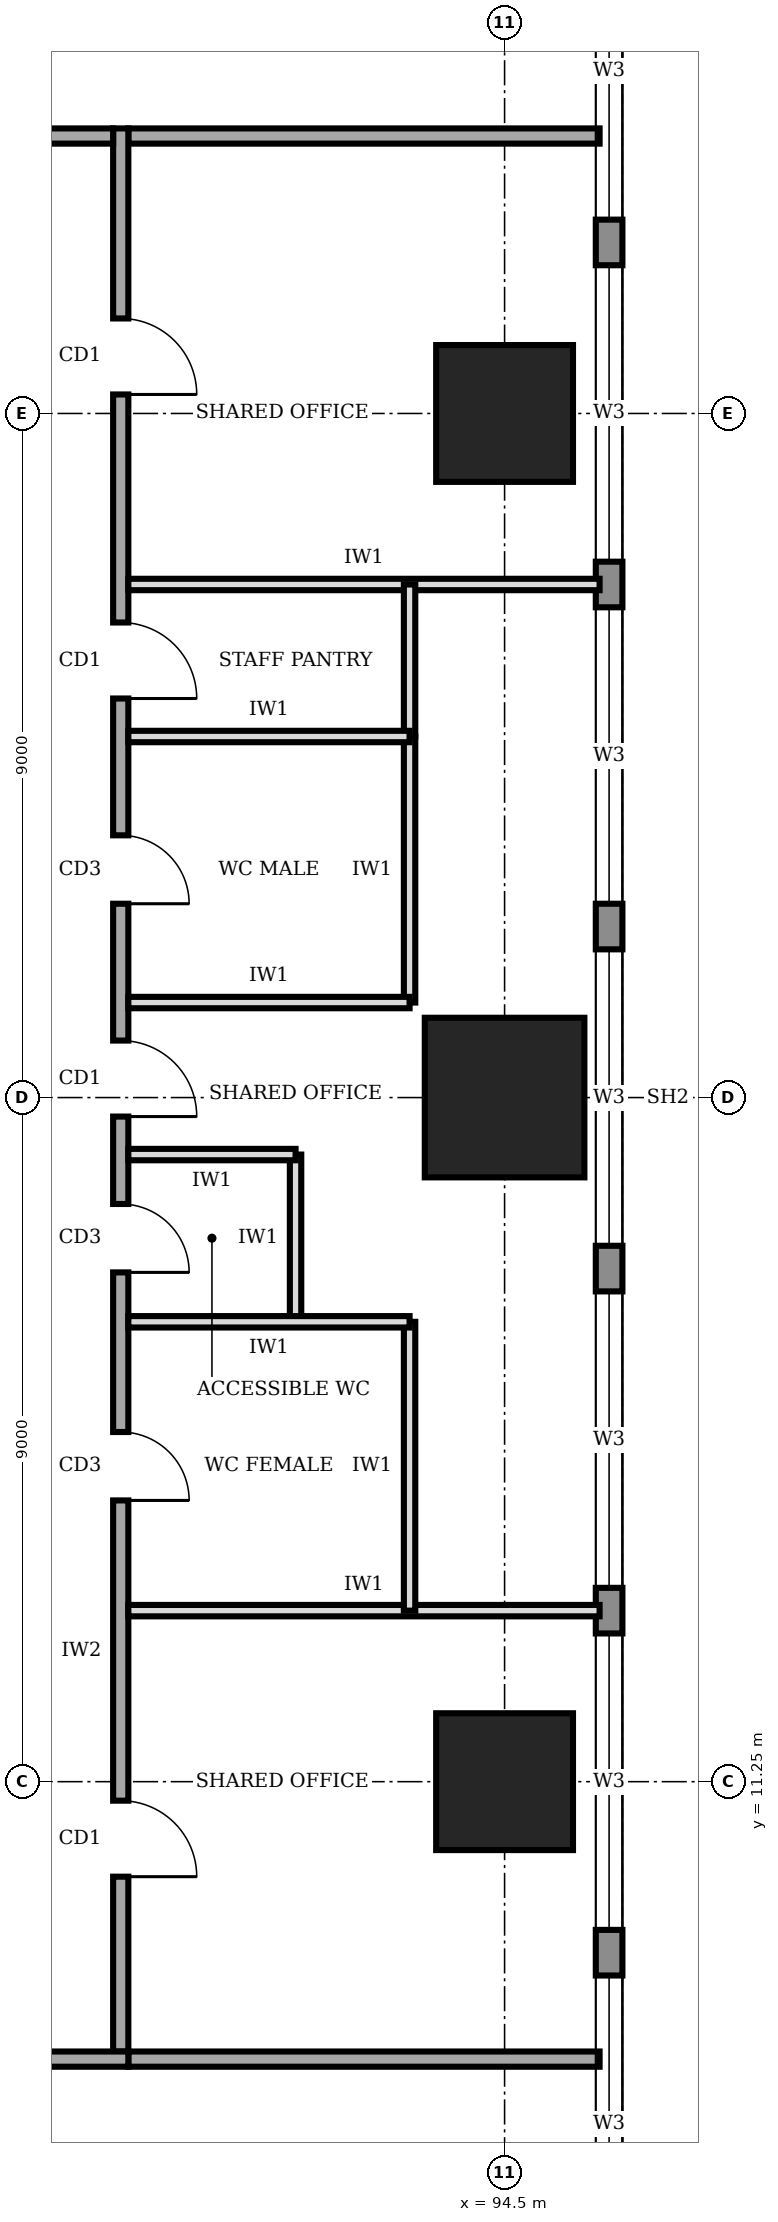
"""IFC4 building model, lengths in metres.
Left out: names, types, materials, properties, quantities, classifications, styles, units other than length and angle.
Written with IfcOpenShell. Run it as: python <this file> out.ifc"""

import sys

from ifc_helpers import new_model, si_unit, direction, frame, frame_2d, origin, origin_2d, place, context, subcontext, project, spatial, rectangle, extrude, element, fill, save


model = new_model("IFC4")
c1 = context("Model", 3, precision=1e-05, world=origin(), true_north=direction((0.0, 1.0)))
c2 = subcontext(c1, "Body", "Model", "MODEL_VIEW")
j1 = project(units=[si_unit("LENGTHUNIT", "METRE"), si_unit("PLANEANGLEUNIT", "RADIAN")], contexts=[c1])
p1 = place(None, origin())
s1 = spatial("IfcSite", under=j1, at=p1, CompositionType="ELEMENT")
p2 = place(p1, origin())
s2 = spatial("IfcBuilding", under=s1, at=p2, CompositionType="ELEMENT")
p3 = place(p2, frame((0.0, 0.0, 197.0)))
s3 = spatial("IfcBuildingStorey", under=s2, at=p3, CompositionType="ELEMENT", Elevation=197.0)
p4 = place(p3, frame((94.5, 11.25, 0.0), z_axis=(0.0, 0.0, 1.0), x_axis=(1.0, 0.0, 0.0)))
e1 = element("IfcColumn", 1, at=p4, inside=s3, PredefinedType="COLUMN", context=c2, shape_type="SweptSolid", body=[
    extrude(rectangle(XDim=1.8, YDim=1.8, at=origin_2d()), origin(), (0.0, 0.0, 1.0), 4.0),
])
p5 = place(p3, frame((94.5, 20.25, 0.0), z_axis=(0.0, 0.0, 1.0), x_axis=(1.0, 0.0, 0.0)))
e2 = element("IfcColumn", 2, at=p5, inside=s3, PredefinedType="COLUMN", context=c2, shape_type="SweptSolid", body=[
    extrude(rectangle(XDim=2.1, YDim=2.1, at=origin_2d()), origin(), (0.0, 0.0, 1.0), 4.0),
])
p6 = place(p3, frame((94.5, 29.25, 0.0), z_axis=(0.0, 0.0, 1.0), x_axis=(1.0, 0.0, 0.0)))
e3 = element("IfcColumn", 3, at=p6, inside=s3, PredefinedType="COLUMN", context=c2, shape_type="SweptSolid", body=[
    extrude(rectangle(XDim=1.8, YDim=1.8, at=origin_2d()), origin(), (0.0, 0.0, 1.0), 4.0),
])
p7 = place(p3, frame((95.875, 3.32, 0.0), z_axis=(0.0, 0.0, 1.0), x_axis=(0.0, 1.0, 0.0)))
e4 = element("IfcWall", 4, at=p7, inside=s3, PredefinedType="STANDARD", context=c2, shape_type="SweptSolid", body=[
    extrude(rectangle(XDim=33.86, YDim=0.35, at=frame_2d((16.93, 0.0))), origin(), (0.0, 0.0, 1.0), 3.75),
])
p8 = place(p7, frame((1.48, 0.0, 0.95)))
e5 = element("IfcOpeningElement", 5, at=p8, cuts=e4, PredefinedType="OPENING", context=c2, shape_type="SweptSolid", body=[
    extrude(rectangle(XDim=3.9, YDim=1.8, at=frame_2d((1.95, 0.9))), frame((0.0, 0.185, 0.0), z_axis=(0.0, -1.0, 0.0), x_axis=(1.0, 0.0, 0.0)), (0.0, 0.0, 1.0), 0.37),
])
p9 = place(p7, frame((5.98, 0.0, 0.95)))
e6 = element("IfcOpeningElement", 6, at=p9, cuts=e4, PredefinedType="OPENING", context=c2, shape_type="SweptSolid", body=[
    extrude(rectangle(XDim=3.9, YDim=1.8, at=frame_2d((1.95, 0.9))), frame((0.0, 0.185, 0.0), z_axis=(0.0, -1.0, 0.0), x_axis=(1.0, 0.0, 0.0)), (0.0, 0.0, 1.0), 0.37),
])
p10 = place(p7, frame((10.48, 0.0, 0.95)))
e7 = element("IfcOpeningElement", 7, at=p10, cuts=e4, PredefinedType="OPENING", context=c2, shape_type="SweptSolid", body=[
    extrude(rectangle(XDim=3.9, YDim=1.8, at=frame_2d((1.95, 0.9))), frame((0.0, 0.185, 0.0), z_axis=(0.0, -1.0, 0.0), x_axis=(1.0, 0.0, 0.0)), (0.0, 0.0, 1.0), 0.37),
])
p11 = place(p7, frame((14.98, 0.0, 0.95)))
e8 = element("IfcOpeningElement", 8, at=p11, cuts=e4, PredefinedType="OPENING", context=c2, shape_type="SweptSolid", body=[
    extrude(rectangle(XDim=3.9, YDim=1.8, at=frame_2d((1.95, 0.9))), frame((0.0, 0.185, 0.0), z_axis=(0.0, -1.0, 0.0), x_axis=(1.0, 0.0, 0.0)), (0.0, 0.0, 1.0), 0.37),
])
p12 = place(p7, frame((19.48, 0.0, 0.95)))
e9 = element("IfcOpeningElement", 9, at=p12, cuts=e4, PredefinedType="OPENING", context=c2, shape_type="SweptSolid", body=[
    extrude(rectangle(XDim=3.9, YDim=1.8, at=frame_2d((1.95, 0.9))), frame((0.0, 0.185, 0.0), z_axis=(0.0, -1.0, 0.0), x_axis=(1.0, 0.0, 0.0)), (0.0, 0.0, 1.0), 0.37),
])
p13 = place(p7, frame((23.98, 0.0, 0.95)))
e10 = element("IfcOpeningElement", 10, at=p13, cuts=e4, PredefinedType="OPENING", context=c2, shape_type="SweptSolid", body=[
    extrude(rectangle(XDim=3.9, YDim=1.8, at=frame_2d((1.95, 0.9))), frame((0.0, 0.185, 0.0), z_axis=(0.0, -1.0, 0.0), x_axis=(1.0, 0.0, 0.0)), (0.0, 0.0, 1.0), 0.37),
])
p14 = place(p7, frame((28.48, 0.0, 0.95)))
e11 = element("IfcOpeningElement", 11, at=p14, cuts=e4, PredefinedType="OPENING", context=c2, shape_type="SweptSolid", body=[
    extrude(rectangle(XDim=3.9, YDim=1.8, at=frame_2d((1.95, 0.9))), frame((0.0, 0.185, 0.0), z_axis=(0.0, -1.0, 0.0), x_axis=(1.0, 0.0, 0.0)), (0.0, 0.0, 1.0), 0.37),
])
p15 = place(p3, frame((72.65, 7.6, 0.0), z_axis=(0.0, 0.0, 1.0), x_axis=(1.0, 0.0, 0.0)))
e12 = element("IfcWall", 12, at=p15, inside=s3, PredefinedType="SOLIDWALL", context=c2, shape_type="SweptSolid", body=[
    extrude(rectangle(XDim=16.9, YDim=0.2, at=frame_2d((8.45, 0.0))), origin(), (0.0, 0.0, 1.0), 3.75),
])
p16 = place(p15, frame((3.575, 0.0, 0.0)))
e13 = element("IfcOpeningElement", 13, at=p16, cuts=e12, PredefinedType="OPENING", context=c2, shape_type="SweptSolid", body=[
    extrude(rectangle(XDim=1.0, YDim=2.1, at=frame_2d((0.5, 1.05))), frame((0.0, 0.11, 0.0), z_axis=(0.0, -1.0, 0.0), x_axis=(1.0, 0.0, 0.0)), (0.0, 0.0, 1.0), 0.22),
])
p17 = place(p3, frame((89.45, 7.7, 0.0), z_axis=(0.0, 0.0, 1.0), x_axis=(0.0, 1.0, 0.0)))
e14 = element("IfcWall", 14, at=p17, inside=s3, PredefinedType="SOLIDWALL", context=c2, shape_type="SweptSolid", body=[
    extrude(rectangle(XDim=25.3, YDim=0.2, at=frame_2d((12.65, 0.0))), origin(), (0.0, 0.0, 1.0), 3.75),
])
p18 = place(p17, frame((2.3, 0.0, 0.0)))
e15 = element("IfcOpeningElement", 15, at=p18, cuts=e14, PredefinedType="OPENING", context=c2, shape_type="SweptSolid", body=[
    extrude(rectangle(XDim=1.0, YDim=2.1, at=frame_2d((0.5, 1.05))), frame((0.0, 0.11, 0.0), z_axis=(0.0, -1.0, 0.0), x_axis=(1.0, 0.0, 0.0)), (0.0, 0.0, 1.0), 0.22),
])
p19 = place(p17, frame((7.25, 0.0, 0.0)))
e16 = element("IfcOpeningElement", 16, at=p19, cuts=e14, PredefinedType="OPENING", context=c2, shape_type="SweptSolid", body=[
    extrude(rectangle(XDim=0.9, YDim=2.1, at=frame_2d((0.45, 1.05))), frame((0.0, 0.11, 0.0), z_axis=(0.0, -1.0, 0.0), x_axis=(1.0, 0.0, 0.0)), (0.0, 0.0, 1.0), 0.22),
])
p20 = place(p17, frame((10.25, 0.0, 0.0)))
e17 = element("IfcOpeningElement", 17, at=p20, cuts=e14, PredefinedType="OPENING", context=c2, shape_type="SweptSolid", body=[
    extrude(rectangle(XDim=0.9, YDim=2.1, at=frame_2d((0.45, 1.05))), frame((0.0, 0.11, 0.0), z_axis=(0.0, -1.0, 0.0), x_axis=(1.0, 0.0, 0.0)), (0.0, 0.0, 1.0), 0.22),
])
p21 = place(p17, frame((15.1, 0.0, 0.0)))
e18 = element("IfcOpeningElement", 18, at=p21, cuts=e14, PredefinedType="OPENING", context=c2, shape_type="SweptSolid", body=[
    extrude(rectangle(XDim=0.9, YDim=2.1, at=frame_2d((0.45, 1.05))), frame((0.0, 0.11, 0.0), z_axis=(0.0, -1.0, 0.0), x_axis=(1.0, 0.0, 0.0)), (0.0, 0.0, 1.0), 0.22),
])
p22 = place(p17, frame((17.8, 0.0, 0.0)))
e19 = element("IfcOpeningElement", 19, at=p22, cuts=e14, PredefinedType="OPENING", context=c2, shape_type="SweptSolid", body=[
    extrude(rectangle(XDim=1.0, YDim=2.1, at=frame_2d((0.5, 1.05))), frame((0.0, 0.11, 0.0), z_axis=(0.0, -1.0, 0.0), x_axis=(1.0, 0.0, 0.0)), (0.0, 0.0, 1.0), 0.22),
])
p23 = place(p17, frame((12.3, 0.0, 0.0)))
e20 = element("IfcOpeningElement", 20, at=p23, cuts=e14, PredefinedType="OPENING", context=c2, shape_type="SweptSolid", body=[
    extrude(rectangle(XDim=1.0, YDim=2.1, at=frame_2d((0.5, 1.05))), frame((0.0, 0.11, 0.0), z_axis=(0.0, -1.0, 0.0), x_axis=(1.0, 0.0, 0.0)), (0.0, 0.0, 1.0), 0.22),
])
p24 = place(p17, frame((21.8, 0.0, 0.0)))
e21 = element("IfcOpeningElement", 21, at=p24, cuts=e14, PredefinedType="OPENING", context=c2, shape_type="SweptSolid", body=[
    extrude(rectangle(XDim=1.0, YDim=2.1, at=frame_2d((0.5, 1.05))), frame((0.0, 0.11, 0.0), z_axis=(0.0, -1.0, 0.0), x_axis=(1.0, 0.0, 0.0)), (0.0, 0.0, 1.0), 0.22),
])
p25 = place(p3, frame((89.35, 32.9, 0.0), z_axis=(0.0, 0.0, 1.0), x_axis=(-1.0, 0.0, 0.0)))
e22 = element("IfcWall", 22, at=p25, inside=s3, PredefinedType="SOLIDWALL", context=c2, shape_type="SweptSolid", body=[
    extrude(rectangle(XDim=16.9, YDim=0.2, at=frame_2d((8.45, 0.0))), origin(), (0.0, 0.0, 1.0), 3.75),
])
p26 = place(p25, frame((14.375, 0.0, 0.0)))
e23 = element("IfcOpeningElement", 23, at=p26, cuts=e22, PredefinedType="OPENING", context=c2, shape_type="SweptSolid", body=[
    extrude(rectangle(XDim=1.0, YDim=2.1, at=frame_2d((0.5, 1.05))), frame((0.0, 0.11, 0.0), z_axis=(0.0, -1.0, 0.0), x_axis=(1.0, 0.0, 0.0)), (0.0, 0.0, 1.0), 0.22),
])
for number, where, z_axis, x_axis in (
    (24, (89.55, 7.6, 0.0), (0.0, 0.0, 1.0), (1.0, 0.0, 0.0)),
    (25, (89.55, 32.9, 0.0), (0.0, 0.0, 1.0), (1.0, 0.0, 0.0)),
):
    element("IfcWall", number, at=place(p3, frame(where, z_axis=z_axis, x_axis=x_axis)), inside=s3, PredefinedType="SOLIDWALL", context=c2, shape_type="SweptSolid", body=[
        extrude(rectangle(XDim=6.2, YDim=0.2, at=frame_2d((3.1, 0.0))), origin(), (0.0, 0.0, 1.0), 3.75),
    ])
for number, where, z_axis, x_axis in (
    (26, (89.55, 13.5, 0.0), (0.0, 0.0, 1.0), (1.0, 0.0, 0.0)),
    (27, (89.55, 27.0, 0.0), (0.0, 0.0, 1.0), (1.0, 0.0, 0.0)),
):
    element("IfcWall", number, at=place(p3, frame(where, z_axis=z_axis, x_axis=x_axis)), inside=s3, PredefinedType="PARTITIONING", context=c2, shape_type="SweptSolid", body=[
        extrude(rectangle(XDim=6.2, YDim=0.15, at=frame_2d((3.1, 0.0))), origin(), (0.0, 0.0, 1.0), 3.75),
    ])
p27 = place(p3, frame((89.55, 17.3, 0.0), z_axis=(0.0, 0.0, 1.0), x_axis=(1.0, 0.0, 0.0)))
e28 = element("IfcWall", 28, at=p27, inside=s3, PredefinedType="PARTITIONING", context=c2, shape_type="SweptSolid", body=[
    extrude(rectangle(XDim=3.7, YDim=0.15, at=frame_2d((1.85, 0.0))), origin(), (0.0, 0.0, 1.0), 3.75),
])
p28 = place(p3, frame((89.55, 19.5, 0.0), z_axis=(0.0, 0.0, 1.0), x_axis=(1.0, 0.0, 0.0)))
e29 = element("IfcWall", 29, at=p28, inside=s3, PredefinedType="PARTITIONING", context=c2, shape_type="SweptSolid", body=[
    extrude(rectangle(XDim=2.2, YDim=0.15, at=frame_2d((1.1, 0.0))), origin(), (0.0, 0.0, 1.0), 2.85),
])
for number, where, z_axis, x_axis in (
    (30, (89.55, 21.5, 0.0), (0.0, 0.0, 1.0), (1.0, 0.0, 0.0)),
    (31, (89.55, 25.0, 0.0), (0.0, 0.0, 1.0), (1.0, 0.0, 0.0)),
):
    element("IfcWall", number, at=place(p3, frame(where, z_axis=z_axis, x_axis=x_axis)), inside=s3, PredefinedType="PARTITIONING", context=c2, shape_type="SweptSolid", body=[
        extrude(rectangle(XDim=3.7, YDim=0.15, at=frame_2d((1.85, 0.0))), origin(), (0.0, 0.0, 1.0), 3.75),
    ])
p29 = place(p3, frame((93.25, 13.5, 0.0), z_axis=(0.0, 0.0, 1.0), x_axis=(0.0, 1.0, 0.0)))
e32 = element("IfcWall", 32, at=p29, inside=s3, PredefinedType="PARTITIONING", context=c2, shape_type="SweptSolid", body=[
    extrude(rectangle(XDim=3.8, YDim=0.15, at=frame_2d((1.9, 0.0))), origin(), (0.0, 0.0, 1.0), 3.75),
])
p30 = place(p3, frame((91.75, 17.3, 0.0), z_axis=(0.0, 0.0, 1.0), x_axis=(0.0, 1.0, 0.0)))
e33 = element("IfcWall", 33, at=p30, inside=s3, PredefinedType="PARTITIONING", context=c2, shape_type="SweptSolid", body=[
    extrude(rectangle(XDim=2.2, YDim=0.15, at=frame_2d((1.1, 0.0))), origin(), (0.0, 0.0, 1.0), 3.75),
])
p31 = place(p3, frame((93.25, 21.5, 0.0), z_axis=(0.0, 0.0, 1.0), x_axis=(0.0, 1.0, 0.0)))
e34 = element("IfcWall", 34, at=p31, inside=s3, PredefinedType="PARTITIONING", context=c2, shape_type="SweptSolid", body=[
    extrude(rectangle(XDim=3.5, YDim=0.15, at=frame_2d((1.75, 0.0))), origin(), (0.0, 0.0, 1.0), 3.75),
])
p32 = place(p3, frame((93.25, 25.0, 0.0), z_axis=(0.0, 0.0, 1.0), x_axis=(0.0, 1.0, 0.0)))
e35 = element("IfcWall", 35, at=p32, inside=s3, PredefinedType="PARTITIONING", context=c2, shape_type="SweptSolid", body=[
    extrude(rectangle(XDim=2.0, YDim=0.15, at=frame_2d((1.0, 0.0))), origin(), (0.0, 0.0, 1.0), 3.75),
])
p33 = place(p8, origin())
e36 = element("IfcWindow", 36, at=p33, inside=s3, PartitioningType="SINGLE_PANEL", PredefinedType="WINDOW", context=c2, shape_type="SweptSolid", body=[
    extrude(rectangle(XDim=3.9, YDim=1.8, at=frame_2d((1.95, 0.9))), frame((0.0, 0.03, 0.0), z_axis=(0.0, -1.0, 0.0), x_axis=(1.0, 0.0, 0.0)), (0.0, 0.0, 1.0), 0.06),
])
fill(e5, e36)
p34 = place(p9, origin())
e37 = element("IfcWindow", 37, at=p34, inside=s3, PartitioningType="SINGLE_PANEL", PredefinedType="WINDOW", context=c2, shape_type="SweptSolid", body=[
    extrude(rectangle(XDim=3.9, YDim=1.8, at=frame_2d((1.95, 0.9))), frame((0.0, 0.03, 0.0), z_axis=(0.0, -1.0, 0.0), x_axis=(1.0, 0.0, 0.0)), (0.0, 0.0, 1.0), 0.06),
])
fill(e6, e37)
p35 = place(p10, origin())
e38 = element("IfcWindow", 38, at=p35, inside=s3, PartitioningType="SINGLE_PANEL", PredefinedType="WINDOW", context=c2, shape_type="SweptSolid", body=[
    extrude(rectangle(XDim=3.9, YDim=1.8, at=frame_2d((1.95, 0.9))), frame((0.0, 0.03, 0.0), z_axis=(0.0, -1.0, 0.0), x_axis=(1.0, 0.0, 0.0)), (0.0, 0.0, 1.0), 0.06),
])
fill(e7, e38)
p36 = place(p11, origin())
e39 = element("IfcWindow", 39, at=p36, inside=s3, PartitioningType="SINGLE_PANEL", PredefinedType="WINDOW", context=c2, shape_type="SweptSolid", body=[
    extrude(rectangle(XDim=3.9, YDim=1.8, at=frame_2d((1.95, 0.9))), frame((0.0, 0.03, 0.0), z_axis=(0.0, -1.0, 0.0), x_axis=(1.0, 0.0, 0.0)), (0.0, 0.0, 1.0), 0.06),
])
fill(e8, e39)
p37 = place(p12, origin())
e40 = element("IfcWindow", 40, at=p37, inside=s3, PartitioningType="SINGLE_PANEL", PredefinedType="WINDOW", context=c2, shape_type="SweptSolid", body=[
    extrude(rectangle(XDim=3.9, YDim=1.8, at=frame_2d((1.95, 0.9))), frame((0.0, 0.03, 0.0), z_axis=(0.0, -1.0, 0.0), x_axis=(1.0, 0.0, 0.0)), (0.0, 0.0, 1.0), 0.06),
])
fill(e9, e40)
p38 = place(p13, origin())
e41 = element("IfcWindow", 41, at=p38, inside=s3, PartitioningType="SINGLE_PANEL", PredefinedType="WINDOW", context=c2, shape_type="SweptSolid", body=[
    extrude(rectangle(XDim=3.9, YDim=1.8, at=frame_2d((1.95, 0.9))), frame((0.0, 0.03, 0.0), z_axis=(0.0, -1.0, 0.0), x_axis=(1.0, 0.0, 0.0)), (0.0, 0.0, 1.0), 0.06),
])
fill(e10, e41)
p39 = place(p14, origin())
e42 = element("IfcWindow", 42, at=p39, inside=s3, PartitioningType="SINGLE_PANEL", PredefinedType="WINDOW", context=c2, shape_type="SweptSolid", body=[
    extrude(rectangle(XDim=3.9, YDim=1.8, at=frame_2d((1.95, 0.9))), frame((0.0, 0.03, 0.0), z_axis=(0.0, -1.0, 0.0), x_axis=(1.0, 0.0, 0.0)), (0.0, 0.0, 1.0), 0.06),
])
fill(e11, e42)
p40 = place(p18, frame((1.0, 0.0, 0.0), z_axis=(0.0, 0.0, 1.0), x_axis=(-1.0, 0.0, 0.0)))
e43 = element("IfcDoor", 43, at=p40, inside=s3, OperationType="SINGLE_SWING_RIGHT", PredefinedType="DOOR", context=c2, shape_type="SweptSolid", body=[
    extrude(rectangle(XDim=1.0, YDim=2.1, at=frame_2d((0.5, 1.05))), frame((0.0, 0.025, 0.0), z_axis=(0.0, -1.0, 0.0), x_axis=(1.0, 0.0, 0.0)), (0.0, 0.0, 1.0), 0.05),
])
fill(e15, e43)
p41 = place(p19, frame((0.9, 0.0, 0.0), z_axis=(0.0, 0.0, 1.0), x_axis=(-1.0, 0.0, 0.0)))
e44 = element("IfcDoor", 44, at=p41, inside=s3, OperationType="SINGLE_SWING_RIGHT", PredefinedType="DOOR", context=c2, shape_type="SweptSolid", body=[
    extrude(rectangle(XDim=0.9, YDim=2.1, at=frame_2d((0.45, 1.05))), frame((0.0, 0.025, 0.0), z_axis=(0.0, -1.0, 0.0), x_axis=(1.0, 0.0, 0.0)), (0.0, 0.0, 1.0), 0.05),
])
fill(e16, e44)
p42 = place(p20, frame((0.9, 0.0, 0.0), z_axis=(0.0, 0.0, 1.0), x_axis=(-1.0, 0.0, 0.0)))
e45 = element("IfcDoor", 45, at=p42, inside=s3, OperationType="SINGLE_SWING_RIGHT", PredefinedType="DOOR", context=c2, shape_type="SweptSolid", body=[
    extrude(rectangle(XDim=0.9, YDim=2.1, at=frame_2d((0.45, 1.05))), frame((0.0, 0.025, 0.0), z_axis=(0.0, -1.0, 0.0), x_axis=(1.0, 0.0, 0.0)), (0.0, 0.0, 1.0), 0.05),
])
fill(e17, e45)
p43 = place(p21, frame((0.9, 0.0, 0.0), z_axis=(0.0, 0.0, 1.0), x_axis=(-1.0, 0.0, 0.0)))
e46 = element("IfcDoor", 46, at=p43, inside=s3, OperationType="SINGLE_SWING_RIGHT", PredefinedType="DOOR", context=c2, shape_type="SweptSolid", body=[
    extrude(rectangle(XDim=0.9, YDim=2.1, at=frame_2d((0.45, 1.05))), frame((0.0, 0.025, 0.0), z_axis=(0.0, -1.0, 0.0), x_axis=(1.0, 0.0, 0.0)), (0.0, 0.0, 1.0), 0.05),
])
fill(e18, e46)
p44 = place(p22, frame((1.0, 0.0, 0.0), z_axis=(0.0, 0.0, 1.0), x_axis=(-1.0, 0.0, 0.0)))
e47 = element("IfcDoor", 47, at=p44, inside=s3, OperationType="SINGLE_SWING_RIGHT", PredefinedType="DOOR", context=c2, shape_type="SweptSolid", body=[
    extrude(rectangle(XDim=1.0, YDim=2.1, at=frame_2d((0.5, 1.05))), frame((0.0, 0.025, 0.0), z_axis=(0.0, -1.0, 0.0), x_axis=(1.0, 0.0, 0.0)), (0.0, 0.0, 1.0), 0.05),
])
fill(e19, e47)
p45 = place(p23, frame((1.0, 0.0, 0.0), z_axis=(0.0, 0.0, 1.0), x_axis=(-1.0, 0.0, 0.0)))
e48 = element("IfcDoor", 48, at=p45, inside=s3, OperationType="SINGLE_SWING_RIGHT", PredefinedType="DOOR", context=c2, shape_type="SweptSolid", body=[
    extrude(rectangle(XDim=1.0, YDim=2.1, at=frame_2d((0.5, 1.05))), frame((0.0, 0.025, 0.0), z_axis=(0.0, -1.0, 0.0), x_axis=(1.0, 0.0, 0.0)), (0.0, 0.0, 1.0), 0.05),
])
fill(e20, e48)
p46 = place(p24, frame((1.0, 0.0, 0.0), z_axis=(0.0, 0.0, 1.0), x_axis=(-1.0, 0.0, 0.0)))
e49 = element("IfcDoor", 49, at=p46, inside=s3, OperationType="SINGLE_SWING_RIGHT", PredefinedType="DOOR", context=c2, shape_type="SweptSolid", body=[
    extrude(rectangle(XDim=1.0, YDim=2.1, at=frame_2d((0.5, 1.05))), frame((0.0, 0.025, 0.0), z_axis=(0.0, -1.0, 0.0), x_axis=(1.0, 0.0, 0.0)), (0.0, 0.0, 1.0), 0.05),
])
fill(e21, e49)
save(model, sys.argv[1])
